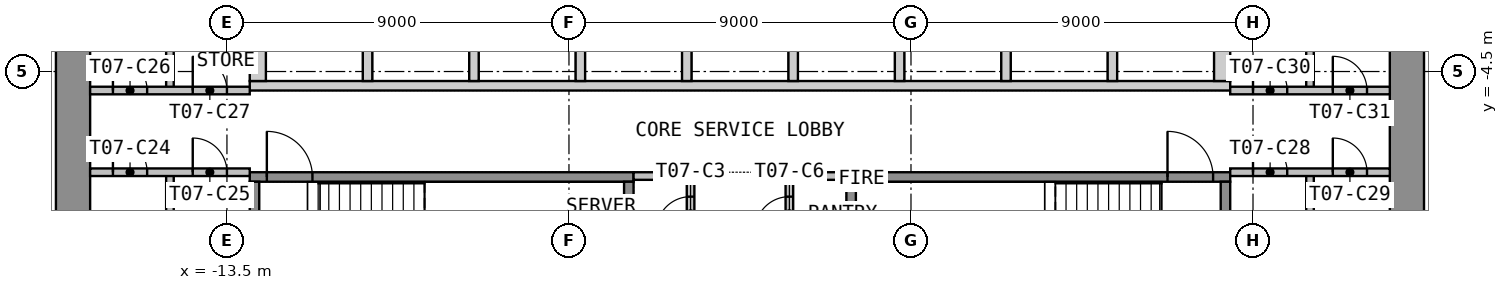
"""IFC4 building model, lengths in metres.
Left out: names, types, materials, properties, quantities, classifications, styles, units other than length and angle.
Written with IfcOpenShell. Run it as: python <this file> out.ifc"""

import sys

from ifc_helpers import new_model, si_unit, direction, frame, frame_2d, origin, place, context, subcontext, project, spatial, polyline, rectangle, outline, extrude, element, fill, save


model = new_model("IFC4")
c1 = context("Model", 3, precision=1e-05, world=origin(), true_north=direction((0.0, 1.0)))
c2 = subcontext(c1, "Body", "Model", "MODEL_VIEW")
j1 = project(units=[si_unit("LENGTHUNIT", "METRE"), si_unit("PLANEANGLEUNIT", "RADIAN")], contexts=[c1])
p1 = place(None, origin())
s1 = spatial("IfcSite", under=j1, at=p1, CompositionType="ELEMENT")
p2 = place(p1, origin())
s2 = spatial("IfcBuilding", under=s1, at=p2, CompositionType="ELEMENT")
p3 = place(p2, frame((0.0, 0.0, 104.7)))
s3 = spatial("IfcBuildingStorey", under=s2, at=p3, CompositionType="ELEMENT", Elevation=104.7)
p4 = place(p3, frame((-17.55, -12.6, 0.0), z_axis=(0.0, 0.0, 1.0), x_axis=(0.0, 1.0, 0.0)))
e1 = element("IfcWall", 1, at=p4, inside=s3, PredefinedType="SHEAR", context=c2, shape_type="SweptSolid", body=[
    extrude(rectangle(XDim=25.2, YDim=0.9, at=frame_2d((12.6, 0.0))), origin(), (0.0, 0.0, 1.0), 3.525),
])
p5 = place(p4, frame((11.4, 0.0, 0.0)))
e2 = element("IfcOpeningElement", 2, at=p5, cuts=e1, PredefinedType="OPENING", context=c2, shape_type="SweptSolid", body=[
    extrude(rectangle(XDim=2.4, YDim=2.1, at=frame_2d((1.2, 1.05))), frame((0.0, 0.46, 0.0), z_axis=(0.0, -1.0, 0.0), x_axis=(1.0, 0.0, 0.0)), (0.0, 0.0, 1.0), 0.92),
])
p6 = place(p3, frame((17.55, -12.6, 0.0), z_axis=(0.0, 0.0, 1.0), x_axis=(0.0, 1.0, 0.0)))
e3 = element("IfcWall", 3, at=p6, inside=s3, PredefinedType="SHEAR", context=c2, shape_type="SweptSolid", body=[
    extrude(rectangle(XDim=25.2, YDim=0.9, at=frame_2d((12.6, 0.0))), origin(), (0.0, 0.0, 1.0), 3.525),
])
p7 = place(p6, frame((11.4, 0.0, 0.0)))
e4 = element("IfcOpeningElement", 4, at=p7, cuts=e3, PredefinedType="OPENING", context=c2, shape_type="SweptSolid", body=[
    extrude(rectangle(XDim=2.4, YDim=2.1, at=frame_2d((1.2, 1.05))), frame((0.0, 0.46, 0.0), z_axis=(0.0, -1.0, 0.0), x_axis=(1.0, 0.0, 0.0)), (0.0, 0.0, 1.0), 0.92),
])
p8 = place(p3, origin())
e5 = element("IfcWall", 5, at=p8, inside=s3, PredefinedType="SHEAR", context=c2, shape_type="SweptSolid", body=[
    extrude(outline(polyline([(-12.9, -5.0), (12.9, -5.0), (12.9, -4.75), (-12.9, -4.75), (-12.9, -5.0)])), origin(), (0.0, 0.0, 1.0), 3.525),
])
p9 = place(p3, origin())
e6 = element("IfcWall", 6, at=p9, inside=s3, PredefinedType="SHEAR", context=c2, shape_type="SweptSolid", body=[
    extrude(outline(polyline([(-12.9, -4.75), (-12.475, -4.75), (-12.475, -2.05), (-12.9, -2.05), (-12.9, -4.75)])), origin(), (0.0, 0.0, 1.0), 3.525),
])
p10 = place(p3, origin())
e7 = element("IfcWall", 7, at=p10, inside=s3, PredefinedType="SHEAR", context=c2, shape_type="SweptSolid", body=[
    extrude(outline(polyline([(-9.925, -4.75), (-9.675, -4.75), (-9.675, -2.05), (-9.925, -2.05), (-9.925, -4.75)])), origin(), (0.0, 0.0, 1.0), 3.525),
])
p11 = place(p3, origin())
e8 = element("IfcWall", 8, at=p11, inside=s3, PredefinedType="SHEAR", context=c2, shape_type="SweptSolid", body=[
    extrude(outline(polyline([(-7.125, -4.75), (-6.875, -4.75), (-6.875, -2.05), (-7.125, -2.05), (-7.125, -4.75)])), origin(), (0.0, 0.0, 1.0), 3.525),
])
p12 = place(p3, origin())
e9 = element("IfcWall", 9, at=p12, inside=s3, PredefinedType="SHEAR", context=c2, shape_type="SweptSolid", body=[
    extrude(outline(polyline([(-4.325, -4.75), (-4.075, -4.75), (-4.075, -2.05), (-4.325, -2.05), (-4.325, -4.75)])), origin(), (0.0, 0.0, 1.0), 3.525),
])
p13 = place(p3, origin())
e10 = element("IfcWall", 10, at=p13, inside=s3, PredefinedType="SHEAR", context=c2, shape_type="SweptSolid", body=[
    extrude(outline(polyline([(-1.525, -4.75), (-1.275, -4.75), (-1.275, -2.05), (-1.525, -2.05), (-1.525, -4.75)])), origin(), (0.0, 0.0, 1.0), 3.525),
])
p14 = place(p3, origin())
e11 = element("IfcWall", 11, at=p14, inside=s3, PredefinedType="SHEAR", context=c2, shape_type="SweptSolid", body=[
    extrude(outline(polyline([(1.275, -4.75), (1.525, -4.75), (1.525, -2.05), (1.275, -2.05), (1.275, -4.75)])), origin(), (0.0, 0.0, 1.0), 3.525),
])
p15 = place(p3, origin())
e12 = element("IfcWall", 12, at=p15, inside=s3, PredefinedType="SHEAR", context=c2, shape_type="SweptSolid", body=[
    extrude(outline(polyline([(4.075, -4.75), (4.325, -4.75), (4.325, -2.05), (4.075, -2.05), (4.075, -4.75)])), origin(), (0.0, 0.0, 1.0), 3.525),
])
p16 = place(p3, origin())
e13 = element("IfcWall", 13, at=p16, inside=s3, PredefinedType="SHEAR", context=c2, shape_type="SweptSolid", body=[
    extrude(outline(polyline([(6.875, -4.75), (7.125, -4.75), (7.125, -2.05), (6.875, -2.05), (6.875, -4.75)])), origin(), (0.0, 0.0, 1.0), 3.525),
])
p17 = place(p3, origin())
e14 = element("IfcWall", 14, at=p17, inside=s3, PredefinedType="SHEAR", context=c2, shape_type="SweptSolid", body=[
    extrude(outline(polyline([(9.675, -4.75), (9.925, -4.75), (9.925, -2.05), (9.675, -2.05), (9.675, -4.75)])), origin(), (0.0, 0.0, 1.0), 3.525),
])
p18 = place(p3, origin())
e15 = element("IfcWall", 15, at=p18, inside=s3, PredefinedType="SHEAR", context=c2, shape_type="SweptSolid", body=[
    extrude(outline(polyline([(12.475, -4.75), (12.9, -4.75), (12.9, -2.05), (12.475, -2.05), (12.475, -4.75)])), origin(), (0.0, 0.0, 1.0), 3.525),
])
p19 = place(p3, frame((-12.9, -7.275, 0.0), z_axis=(0.0, 0.0, 1.0), x_axis=(1.0, 0.0, 0.0)))
e16 = element("IfcWall", 16, at=p19, inside=s3, PredefinedType="SHEAR", context=c2, shape_type="SweptSolid", body=[
    extrude(rectangle(XDim=10.1, YDim=0.25, at=frame_2d((5.05, 0.0))), origin(), (0.0, 0.0, 1.0), 3.525),
])
p20 = place(p19, frame((0.45, 0.0, 0.0)))
e17 = element("IfcOpeningElement", 17, at=p20, cuts=e16, PredefinedType="OPENING", context=c2, shape_type="SweptSolid", body=[
    extrude(rectangle(XDim=1.2, YDim=2.1, at=frame_2d((0.6, 1.05))), frame((0.0, 0.135, 0.0), z_axis=(0.0, -1.0, 0.0), x_axis=(1.0, 0.0, 0.0)), (0.0, 0.0, 1.0), 0.27),
])
for number, where, z_axis, x_axis in (
    (18, (-12.775, -10.65, 0.0), (0.0, 0.0, 1.0), (0.0, 1.0, 0.0)),
    (19, (-2.925, -10.65, 0.0), (0.0, 0.0, 1.0), (0.0, 1.0, 0.0)),
):
    element("IfcWall", number, at=place(p3, frame(where, z_axis=z_axis, x_axis=x_axis)), inside=s3, PredefinedType="SHEAR", context=c2, shape_type="SweptSolid", body=[
        extrude(rectangle(XDim=3.25, YDim=0.25, at=frame_2d((1.625, 0.0))), origin(), (0.0, 0.0, 1.0), 3.525),
    ])
p21 = place(p3, frame((2.8, -7.275, 0.0), z_axis=(0.0, 0.0, 1.0), x_axis=(1.0, 0.0, 0.0)))
e20 = element("IfcWall", 20, at=p21, inside=s3, PredefinedType="SHEAR", context=c2, shape_type="SweptSolid", body=[
    extrude(rectangle(XDim=10.1, YDim=0.25, at=frame_2d((5.05, 0.0))), origin(), (0.0, 0.0, 1.0), 3.525),
])
p22 = place(p21, frame((8.45, 0.0, 0.0)))
e21 = element("IfcOpeningElement", 21, at=p22, cuts=e20, PredefinedType="OPENING", context=c2, shape_type="SweptSolid", body=[
    extrude(rectangle(XDim=1.2, YDim=2.1, at=frame_2d((0.6, 1.05))), frame((0.0, 0.135, 0.0), z_axis=(0.0, -1.0, 0.0), x_axis=(1.0, 0.0, 0.0)), (0.0, 0.0, 1.0), 0.27),
])
for number, where, z_axis, x_axis in (
    (22, (2.925, -10.65, 0.0), (0.0, 0.0, 1.0), (0.0, 1.0, 0.0)),
    (23, (12.775, -10.65, 0.0), (0.0, 0.0, 1.0), (0.0, 1.0, 0.0)),
):
    element("IfcWall", number, at=place(p3, frame(where, z_axis=z_axis, x_axis=x_axis)), inside=s3, PredefinedType="SHEAR", context=c2, shape_type="SweptSolid", body=[
        extrude(rectangle(XDim=3.25, YDim=0.25, at=frame_2d((1.625, 0.0))), origin(), (0.0, 0.0, 1.0), 3.525),
    ])
for number, where, z_axis, x_axis in (
    (24, (-2.8, -7.25, 0.0), (0.0, 0.0, 1.0), (1.0, 0.0, 0.0)),
    (25, (1.4, -7.25, 0.0), (0.0, 0.0, 1.0), (1.0, 0.0, 0.0)),
):
    element("IfcWall", number, at=place(p3, frame(where, z_axis=z_axis, x_axis=x_axis)), inside=s3, PredefinedType="PARTITIONING", context=c2, shape_type="SweptSolid", body=[
        extrude(rectangle(XDim=1.4, YDim=0.2, at=frame_2d((0.7, 0.0))), origin(), (0.0, 0.0, 1.0), 3.525),
    ])
p23 = place(p3, frame((-1.3, -12.6, 0.0), z_axis=(0.0, 0.0, 1.0), x_axis=(0.0, 1.0, 0.0)))
e26 = element("IfcWall", 26, at=p23, inside=s3, PredefinedType="PARTITIONING", context=c2, shape_type="SweptSolid", body=[
    extrude(rectangle(XDim=5.45, YDim=0.2, at=frame_2d((2.725, 0.0))), origin(), (0.0, 0.0, 1.0), 3.525),
])
p24 = place(p23, frame((0.416, 0.0, 0.0)))
e27 = element("IfcOpeningElement", 27, at=p24, cuts=e26, PredefinedType="OPENING", context=c2, shape_type="SweptSolid", body=[
    extrude(rectangle(XDim=0.9, YDim=2.1, at=frame_2d((0.45, 1.05))), frame((0.0, 0.11, 0.0), z_axis=(0.0, -1.0, 0.0), x_axis=(1.0, 0.0, 0.0)), (0.0, 0.0, 1.0), 0.22),
])
p25 = place(p23, frame((2.149, 0.0, 0.0)))
e28 = element("IfcOpeningElement", 28, at=p25, cuts=e26, PredefinedType="OPENING", context=c2, shape_type="SweptSolid", body=[
    extrude(rectangle(XDim=0.9, YDim=2.1, at=frame_2d((0.45, 1.05))), frame((0.0, 0.11, 0.0), z_axis=(0.0, -1.0, 0.0), x_axis=(1.0, 0.0, 0.0)), (0.0, 0.0, 1.0), 0.22),
])
p26 = place(p23, frame((3.907, 0.0, 0.0)))
e29 = element("IfcOpeningElement", 29, at=p26, cuts=e26, PredefinedType="OPENING", context=c2, shape_type="SweptSolid", body=[
    extrude(rectangle(XDim=0.9, YDim=2.1, at=frame_2d((0.45, 1.05))), frame((0.0, 0.11, 0.0), z_axis=(0.0, -1.0, 0.0), x_axis=(1.0, 0.0, 0.0)), (0.0, 0.0, 1.0), 0.22),
])
p27 = place(p3, frame((1.3, -12.6, 0.0), z_axis=(0.0, 0.0, 1.0), x_axis=(0.0, 1.0, 0.0)))
e30 = element("IfcWall", 30, at=p27, inside=s3, PredefinedType="PARTITIONING", context=c2, shape_type="SweptSolid", body=[
    extrude(rectangle(XDim=5.45, YDim=0.2, at=frame_2d((2.725, 0.0))), origin(), (0.0, 0.0, 1.0), 3.525),
])
p28 = place(p27, frame((0.416, 0.0, 0.0)))
e31 = element("IfcOpeningElement", 31, at=p28, cuts=e30, PredefinedType="OPENING", context=c2, shape_type="SweptSolid", body=[
    extrude(rectangle(XDim=0.9, YDim=2.1, at=frame_2d((0.45, 1.05))), frame((0.0, 0.11, 0.0), z_axis=(0.0, -1.0, 0.0), x_axis=(1.0, 0.0, 0.0)), (0.0, 0.0, 1.0), 0.22),
])
p29 = place(p27, frame((2.149, 0.0, 0.0)))
e32 = element("IfcOpeningElement", 32, at=p29, cuts=e30, PredefinedType="OPENING", context=c2, shape_type="SweptSolid", body=[
    extrude(rectangle(XDim=0.9, YDim=2.1, at=frame_2d((0.45, 1.05))), frame((0.0, 0.11, 0.0), z_axis=(0.0, -1.0, 0.0), x_axis=(1.0, 0.0, 0.0)), (0.0, 0.0, 1.0), 0.22),
])
p30 = place(p27, frame((3.907, 0.0, 0.0)))
e33 = element("IfcOpeningElement", 33, at=p30, cuts=e30, PredefinedType="OPENING", context=c2, shape_type="SweptSolid", body=[
    extrude(rectangle(XDim=0.9, YDim=2.1, at=frame_2d((0.45, 1.05))), frame((0.0, 0.11, 0.0), z_axis=(0.0, -1.0, 0.0), x_axis=(1.0, 0.0, 0.0)), (0.0, 0.0, 1.0), 0.22),
])
p31 = place(p3, frame((-15.0, -12.6, 0.0), z_axis=(0.0, 0.0, 1.0), x_axis=(0.0, 1.0, 0.0)))
e34 = element("IfcWall", 34, at=p31, inside=s3, PredefinedType="PARTITIONING", context=c2, shape_type="SweptSolid", body=[
    extrude(rectangle(XDim=5.45, YDim=0.2, at=frame_2d((2.725, 0.0))), origin(), (0.0, 0.0, 1.0), 3.525),
])
p32 = place(p3, frame((-17.1, -7.15, 0.0), z_axis=(0.0, 0.0, 1.0), x_axis=(1.0, 0.0, 0.0)))
e35 = element("IfcWall", 35, at=p32, inside=s3, PredefinedType="PARTITIONING", context=c2, shape_type="SweptSolid", body=[
    extrude(rectangle(XDim=4.2, YDim=0.2, at=frame_2d((2.1, 0.0))), origin(), (0.0, 0.0, 1.0), 3.525),
])
p33 = place(p32, frame((0.6, 0.0, 0.0)))
e36 = element("IfcOpeningElement", 36, at=p33, cuts=e35, PredefinedType="OPENING", context=c2, shape_type="SweptSolid", body=[
    extrude(rectangle(XDim=0.9, YDim=2.1, at=frame_2d((0.45, 1.05))), frame((0.0, 0.11, 0.0), z_axis=(0.0, -1.0, 0.0), x_axis=(1.0, 0.0, 0.0)), (0.0, 0.0, 1.0), 0.22),
])
p34 = place(p32, frame((2.7, 0.0, 0.0)))
e37 = element("IfcOpeningElement", 37, at=p34, cuts=e35, PredefinedType="OPENING", context=c2, shape_type="SweptSolid", body=[
    extrude(rectangle(XDim=0.9, YDim=2.1, at=frame_2d((0.45, 1.05))), frame((0.0, 0.11, 0.0), z_axis=(0.0, -1.0, 0.0), x_axis=(1.0, 0.0, 0.0)), (0.0, 0.0, 1.0), 0.22),
])
p35 = place(p3, frame((-15.0, -5.0, 0.0), z_axis=(0.0, 0.0, 1.0), x_axis=(0.0, 1.0, 0.0)))
e38 = element("IfcWall", 38, at=p35, inside=s3, PredefinedType="PARTITIONING", context=c2, shape_type="SweptSolid", body=[
    extrude(rectangle(XDim=3.2, YDim=0.2, at=frame_2d((1.6, 0.0))), origin(), (0.0, 0.0, 1.0), 3.525),
])
p36 = place(p3, frame((-17.1, -5.0, 0.0), z_axis=(0.0, 0.0, 1.0), x_axis=(1.0, 0.0, 0.0)))
e39 = element("IfcWall", 39, at=p36, inside=s3, PredefinedType="PARTITIONING", context=c2, shape_type="SweptSolid", body=[
    extrude(rectangle(XDim=4.2, YDim=0.2, at=frame_2d((2.1, 0.0))), origin(), (0.0, 0.0, 1.0), 3.525),
])
p37 = place(p36, frame((0.6, 0.0, 0.0)))
e40 = element("IfcOpeningElement", 40, at=p37, cuts=e39, PredefinedType="OPENING", context=c2, shape_type="SweptSolid", body=[
    extrude(rectangle(XDim=0.9, YDim=2.1, at=frame_2d((0.45, 1.05))), frame((0.0, 0.11, 0.0), z_axis=(0.0, -1.0, 0.0), x_axis=(1.0, 0.0, 0.0)), (0.0, 0.0, 1.0), 0.22),
])
p38 = place(p36, frame((2.7, 0.0, 0.0)))
e41 = element("IfcOpeningElement", 41, at=p38, cuts=e39, PredefinedType="OPENING", context=c2, shape_type="SweptSolid", body=[
    extrude(rectangle(XDim=0.9, YDim=2.1, at=frame_2d((0.45, 1.05))), frame((0.0, 0.11, 0.0), z_axis=(0.0, -1.0, 0.0), x_axis=(1.0, 0.0, 0.0)), (0.0, 0.0, 1.0), 0.22),
])
p39 = place(p3, frame((15.0, -12.6, 0.0), z_axis=(0.0, 0.0, 1.0), x_axis=(0.0, 1.0, 0.0)))
e42 = element("IfcWall", 42, at=p39, inside=s3, PredefinedType="PARTITIONING", context=c2, shape_type="SweptSolid", body=[
    extrude(rectangle(XDim=5.45, YDim=0.2, at=frame_2d((2.725, 0.0))), origin(), (0.0, 0.0, 1.0), 3.525),
])
p40 = place(p3, frame((12.9, -7.15, 0.0), z_axis=(0.0, 0.0, 1.0), x_axis=(1.0, 0.0, 0.0)))
e43 = element("IfcWall", 43, at=p40, inside=s3, PredefinedType="PARTITIONING", context=c2, shape_type="SweptSolid", body=[
    extrude(rectangle(XDim=4.2, YDim=0.2, at=frame_2d((2.1, 0.0))), origin(), (0.0, 0.0, 1.0), 3.525),
])
p41 = place(p40, frame((0.6, 0.0, 0.0)))
e44 = element("IfcOpeningElement", 44, at=p41, cuts=e43, PredefinedType="OPENING", context=c2, shape_type="SweptSolid", body=[
    extrude(rectangle(XDim=0.9, YDim=2.1, at=frame_2d((0.45, 1.05))), frame((0.0, 0.11, 0.0), z_axis=(0.0, -1.0, 0.0), x_axis=(1.0, 0.0, 0.0)), (0.0, 0.0, 1.0), 0.22),
])
p42 = place(p40, frame((2.7, 0.0, 0.0)))
e45 = element("IfcOpeningElement", 45, at=p42, cuts=e43, PredefinedType="OPENING", context=c2, shape_type="SweptSolid", body=[
    extrude(rectangle(XDim=0.9, YDim=2.1, at=frame_2d((0.45, 1.05))), frame((0.0, 0.11, 0.0), z_axis=(0.0, -1.0, 0.0), x_axis=(1.0, 0.0, 0.0)), (0.0, 0.0, 1.0), 0.22),
])
p43 = place(p3, frame((15.0, -5.0, 0.0), z_axis=(0.0, 0.0, 1.0), x_axis=(0.0, 1.0, 0.0)))
e46 = element("IfcWall", 46, at=p43, inside=s3, PredefinedType="PARTITIONING", context=c2, shape_type="SweptSolid", body=[
    extrude(rectangle(XDim=3.2, YDim=0.2, at=frame_2d((1.6, 0.0))), origin(), (0.0, 0.0, 1.0), 3.525),
])
p44 = place(p3, frame((12.9, -5.0, 0.0), z_axis=(0.0, 0.0, 1.0), x_axis=(1.0, 0.0, 0.0)))
e47 = element("IfcWall", 47, at=p44, inside=s3, PredefinedType="PARTITIONING", context=c2, shape_type="SweptSolid", body=[
    extrude(rectangle(XDim=4.2, YDim=0.2, at=frame_2d((2.1, 0.0))), origin(), (0.0, 0.0, 1.0), 3.525),
])
p45 = place(p44, frame((0.6, 0.0, 0.0)))
e48 = element("IfcOpeningElement", 48, at=p45, cuts=e47, PredefinedType="OPENING", context=c2, shape_type="SweptSolid", body=[
    extrude(rectangle(XDim=0.9, YDim=2.1, at=frame_2d((0.45, 1.05))), frame((0.0, 0.11, 0.0), z_axis=(0.0, -1.0, 0.0), x_axis=(1.0, 0.0, 0.0)), (0.0, 0.0, 1.0), 0.22),
])
p46 = place(p44, frame((2.7, 0.0, 0.0)))
e49 = element("IfcOpeningElement", 49, at=p46, cuts=e47, PredefinedType="OPENING", context=c2, shape_type="SweptSolid", body=[
    extrude(rectangle(XDim=0.9, YDim=2.1, at=frame_2d((0.45, 1.05))), frame((0.0, 0.11, 0.0), z_axis=(0.0, -1.0, 0.0), x_axis=(1.0, 0.0, 0.0)), (0.0, 0.0, 1.0), 0.22),
])
p47 = place(p20, origin())
e50 = element("IfcDoor", 50, at=p47, inside=s3, OperationType="SINGLE_SWING_LEFT", PredefinedType="DOOR", context=c2, shape_type="SweptSolid", body=[
    extrude(rectangle(XDim=1.2, YDim=2.1, at=frame_2d((0.6, 1.05))), frame((0.0, 0.025, 0.0), z_axis=(0.0, -1.0, 0.0), x_axis=(1.0, 0.0, 0.0)), (0.0, 0.0, 1.0), 0.05),
])
fill(e17, e50)
p48 = place(p22, origin())
e51 = element("IfcDoor", 51, at=p48, inside=s3, OperationType="SINGLE_SWING_LEFT", PredefinedType="DOOR", context=c2, shape_type="SweptSolid", body=[
    extrude(rectangle(XDim=1.2, YDim=2.1, at=frame_2d((0.6, 1.05))), frame((0.0, 0.025, 0.0), z_axis=(0.0, -1.0, 0.0), x_axis=(1.0, 0.0, 0.0)), (0.0, 0.0, 1.0), 0.05),
])
fill(e21, e51)
p49 = place(p26, origin())
e52 = element("IfcDoor", 52, at=p49, inside=s3, OperationType="SINGLE_SWING_LEFT", PredefinedType="DOOR", context=c2, shape_type="SweptSolid", body=[
    extrude(rectangle(XDim=0.9, YDim=2.1, at=frame_2d((0.45, 1.05))), frame((0.0, 0.025, 0.0), z_axis=(0.0, -1.0, 0.0), x_axis=(1.0, 0.0, 0.0)), (0.0, 0.0, 1.0), 0.05),
])
fill(e29, e52)
p50 = place(p30, origin())
e53 = element("IfcDoor", 53, at=p50, inside=s3, OperationType="SINGLE_SWING_LEFT", PredefinedType="DOOR", context=c2, shape_type="SweptSolid", body=[
    extrude(rectangle(XDim=0.9, YDim=2.1, at=frame_2d((0.45, 1.05))), frame((0.0, 0.025, 0.0), z_axis=(0.0, -1.0, 0.0), x_axis=(1.0, 0.0, 0.0)), (0.0, 0.0, 1.0), 0.05),
])
fill(e33, e53)
p51 = place(p33, origin())
e54 = element("IfcDoor", 54, at=p51, inside=s3, OperationType="SINGLE_SWING_LEFT", PredefinedType="DOOR", context=c2, shape_type="SweptSolid", body=[
    extrude(rectangle(XDim=0.9, YDim=2.1, at=frame_2d((0.45, 1.05))), frame((0.0, 0.025, 0.0), z_axis=(0.0, -1.0, 0.0), x_axis=(1.0, 0.0, 0.0)), (0.0, 0.0, 1.0), 0.05),
])
fill(e36, e54)
p52 = place(p34, origin())
e55 = element("IfcDoor", 55, at=p52, inside=s3, OperationType="SINGLE_SWING_LEFT", PredefinedType="DOOR", context=c2, shape_type="SweptSolid", body=[
    extrude(rectangle(XDim=0.9, YDim=2.1, at=frame_2d((0.45, 1.05))), frame((0.0, 0.025, 0.0), z_axis=(0.0, -1.0, 0.0), x_axis=(1.0, 0.0, 0.0)), (0.0, 0.0, 1.0), 0.05),
])
fill(e37, e55)
p53 = place(p37, origin())
e56 = element("IfcDoor", 56, at=p53, inside=s3, OperationType="SINGLE_SWING_LEFT", PredefinedType="DOOR", context=c2, shape_type="SweptSolid", body=[
    extrude(rectangle(XDim=0.9, YDim=2.1, at=frame_2d((0.45, 1.05))), frame((0.0, 0.025, 0.0), z_axis=(0.0, -1.0, 0.0), x_axis=(1.0, 0.0, 0.0)), (0.0, 0.0, 1.0), 0.05),
])
fill(e40, e56)
p54 = place(p38, origin())
e57 = element("IfcDoor", 57, at=p54, inside=s3, OperationType="SINGLE_SWING_LEFT", PredefinedType="DOOR", context=c2, shape_type="SweptSolid", body=[
    extrude(rectangle(XDim=0.9, YDim=2.1, at=frame_2d((0.45, 1.05))), frame((0.0, 0.025, 0.0), z_axis=(0.0, -1.0, 0.0), x_axis=(1.0, 0.0, 0.0)), (0.0, 0.0, 1.0), 0.05),
])
fill(e41, e57)
p55 = place(p41, origin())
e58 = element("IfcDoor", 58, at=p55, inside=s3, OperationType="SINGLE_SWING_LEFT", PredefinedType="DOOR", context=c2, shape_type="SweptSolid", body=[
    extrude(rectangle(XDim=0.9, YDim=2.1, at=frame_2d((0.45, 1.05))), frame((0.0, 0.025, 0.0), z_axis=(0.0, -1.0, 0.0), x_axis=(1.0, 0.0, 0.0)), (0.0, 0.0, 1.0), 0.05),
])
fill(e44, e58)
p56 = place(p42, origin())
e59 = element("IfcDoor", 59, at=p56, inside=s3, OperationType="SINGLE_SWING_LEFT", PredefinedType="DOOR", context=c2, shape_type="SweptSolid", body=[
    extrude(rectangle(XDim=0.9, YDim=2.1, at=frame_2d((0.45, 1.05))), frame((0.0, 0.025, 0.0), z_axis=(0.0, -1.0, 0.0), x_axis=(1.0, 0.0, 0.0)), (0.0, 0.0, 1.0), 0.05),
])
fill(e45, e59)
p57 = place(p45, origin())
e60 = element("IfcDoor", 60, at=p57, inside=s3, OperationType="SINGLE_SWING_LEFT", PredefinedType="DOOR", context=c2, shape_type="SweptSolid", body=[
    extrude(rectangle(XDim=0.9, YDim=2.1, at=frame_2d((0.45, 1.05))), frame((0.0, 0.025, 0.0), z_axis=(0.0, -1.0, 0.0), x_axis=(1.0, 0.0, 0.0)), (0.0, 0.0, 1.0), 0.05),
])
fill(e48, e60)
p58 = place(p46, origin())
e61 = element("IfcDoor", 61, at=p58, inside=s3, OperationType="SINGLE_SWING_LEFT", PredefinedType="DOOR", context=c2, shape_type="SweptSolid", body=[
    extrude(rectangle(XDim=0.9, YDim=2.1, at=frame_2d((0.45, 1.05))), frame((0.0, 0.025, 0.0), z_axis=(0.0, -1.0, 0.0), x_axis=(1.0, 0.0, 0.0)), (0.0, 0.0, 1.0), 0.05),
])
fill(e49, e61)
save(model, sys.argv[1])
